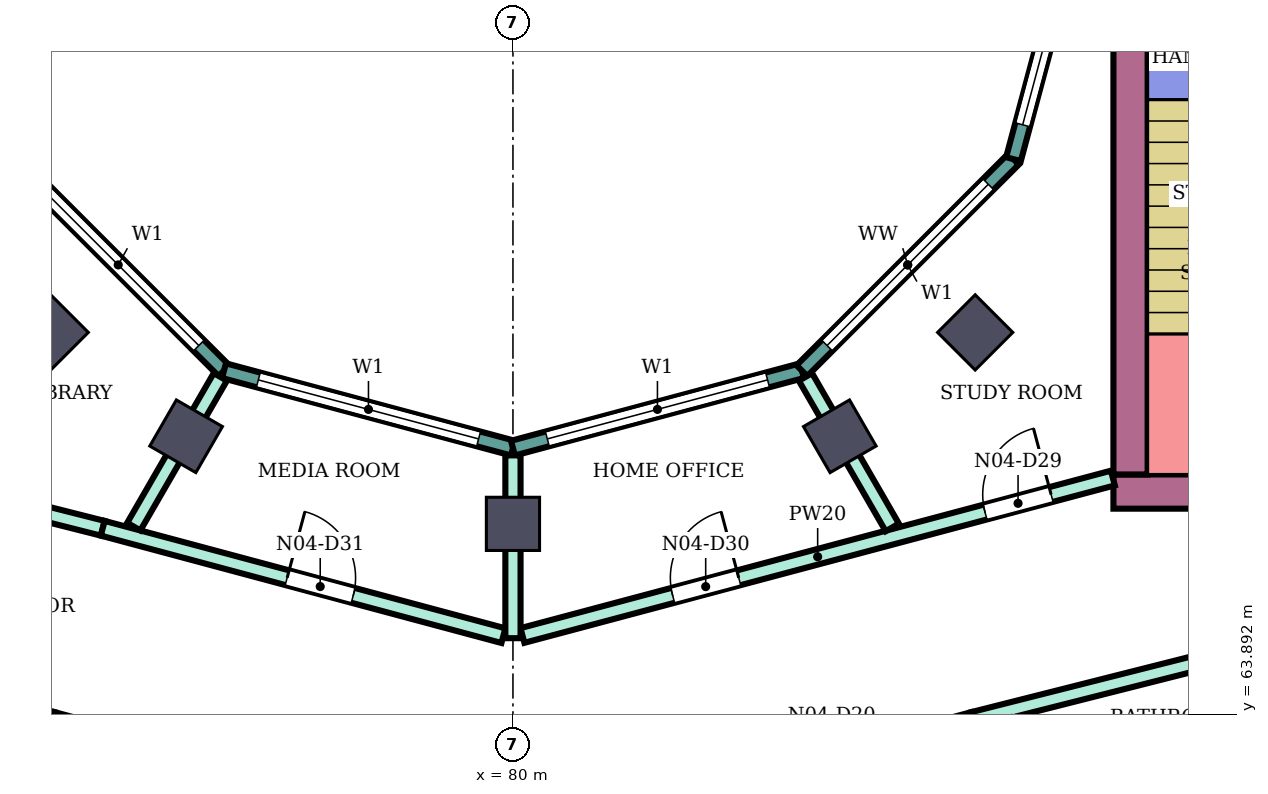
"""IFC4 building model, lengths in metres.
Left out: names, types, materials, properties, quantities, classifications, styles, units other than length and angle.
Written with IfcOpenShell. Run it as: python <this file> out.ifc"""

import sys

from ifc_helpers import new_model, si_unit, direction, frame, frame_2d, origin, origin_2d, place, context, subcontext, project, spatial, rectangle, extrude, element, fill, save


model = new_model("IFC4")
c1 = context("Model", 3, precision=1e-05, world=origin(), true_north=direction((0.0, 1.0)))
c2 = subcontext(c1, "Body", "Model", "MODEL_VIEW")
j1 = project(units=[si_unit("LENGTHUNIT", "METRE"), si_unit("PLANEANGLEUNIT", "RADIAN")], contexts=[c1])
p1 = place(None, origin())
s1 = spatial("IfcSite", under=j1, at=p1, CompositionType="ELEMENT")
p2 = place(p1, origin())
s2 = spatial("IfcBuilding", under=s1, at=p2, CompositionType="ELEMENT")
p3 = place(p2, frame((0.0, 0.0, 305.1)))
s3 = spatial("IfcBuildingStorey", under=s2, at=p3, CompositionType="ELEMENT", Elevation=305.1)
for number, where, z_axis, x_axis in (
    (1, (73.919, 68.919, 0.0), (0.0, 0.0, 1.0), (-0.707, -0.707, 0.0)),
    (2, (75.7, 67.552, 0.0), (0.0, 0.0, 1.0), (-0.5, -0.866, 0.0)),
    (3, (80.0, 66.4, 0.0), (0.0, 0.0, 1.0), (0.0, -1.0, 0.0)),
    (4, (84.3, 67.552, 0.0), (0.0, 0.0, 1.0), (0.5, -0.866, 0.0)),
    (5, (86.081, 68.919, 0.0), (0.0, 0.0, 1.0), (0.707, -0.707, 0.0)),
):
    element("IfcColumn", number, at=place(p3, frame(where, z_axis=z_axis, x_axis=x_axis)), inside=s3, PredefinedType="COLUMN", context=c2, shape_type="SweptSolid", body=[
        extrude(rectangle(XDim=0.7, YDim=0.7, at=origin_2d()), origin(), (0.0, 0.0, 1.0), 4.2),
    ])
p4 = place(p3, frame((87.9, 66.825, 0.0), z_axis=(0.0, 0.0, 1.0), x_axis=(1.0, 0.0, 0.0)))
e6 = element("IfcWall", 6, at=p4, inside=s3, PredefinedType="SHEAR", context=c2, shape_type="SweptSolid", body=[
    extrude(rectangle(XDim=12.0, YDim=0.45, at=frame_2d((6.0, 0.0))), origin(), (0.0, 0.0, 1.0), 3.85),
])
p5 = place(p4, frame((4.2, 0.0, 0.0)))
e7 = element("IfcOpeningElement", 7, at=p5, cuts=e6, PredefinedType="OPENING", context=c2, shape_type="SweptSolid", body=[
    extrude(rectangle(XDim=2.4, YDim=2.4, at=frame_2d((1.2, 1.2))), frame((0.0, 0.235, 0.0), z_axis=(0.0, -1.0, 0.0), x_axis=(1.0, 0.0, 0.0)), (0.0, 0.0, 1.0), 0.47),
])
p6 = place(p3, frame((88.125, 67.05, 0.0), z_axis=(0.0, 0.0, 1.0), x_axis=(0.0, 1.0, 0.0)))
e8 = element("IfcWall", 8, at=p6, inside=s3, PredefinedType="SHEAR", context=c2, shape_type="SweptSolid", body=[
    extrude(rectangle(XDim=7.95, YDim=0.45, at=frame_2d((3.975, 0.0))), origin(), (0.0, 0.0, 1.0), 3.85),
])
p7 = place(p3, frame((73.415, 71.198, 0.0), z_axis=(0.0, 0.0, 1.0), x_axis=(0.707106781187, -0.707106781187, 0.0)))
e9 = element("IfcWall", 9, at=p7, inside=s3, PredefinedType="NOTDEFINED", context=c2, shape_type="SweptSolid", body=[
    extrude(rectangle(XDim=3.936, YDim=0.2, at=frame_2d((1.968, 0.0))), origin(), (0.0, 0.0, 1.0), 4.2),
])
p8 = place(p7, frame((0.468, 0.0, 0.9)))
e10 = element("IfcOpeningElement", 10, at=p8, cuts=e9, PredefinedType="OPENING", context=c2, shape_type="SweptSolid", body=[
    extrude(rectangle(XDim=3.0, YDim=2.3, at=frame_2d((1.5, 1.15))), frame((0.0, 0.11, 0.0), z_axis=(0.0, -1.0, 0.0), x_axis=(1.0, 0.0, 0.0)), (0.0, 0.0, 1.0), 0.22),
])
p9 = place(p3, frame((76.198, 68.415, 0.0), z_axis=(0.0, 0.0, 1.0), x_axis=(0.965933654434, -0.258789828301, 0.0)))
e11 = element("IfcWall", 11, at=p9, inside=s3, PredefinedType="NOTDEFINED", context=c2, shape_type="SweptSolid", body=[
    extrude(rectangle(XDim=3.936, YDim=0.2, at=frame_2d((1.968, 0.0))), origin(), (0.0, 0.0, 1.0), 4.2),
])
p10 = place(p9, frame((0.468, 0.0, 0.9)))
e12 = element("IfcOpeningElement", 12, at=p10, cuts=e11, PredefinedType="OPENING", context=c2, shape_type="SweptSolid", body=[
    extrude(rectangle(XDim=3.0, YDim=2.3, at=frame_2d((1.5, 1.15))), frame((0.0, 0.11, 0.0), z_axis=(0.0, -1.0, 0.0), x_axis=(1.0, 0.0, 0.0)), (0.0, 0.0, 1.0), 0.22),
])
p11 = place(p3, frame((80.0, 67.396, 0.0), z_axis=(0.0, 0.0, 1.0), x_axis=(0.965933654434, 0.258789828301, 0.0)))
e13 = element("IfcWall", 13, at=p11, inside=s3, PredefinedType="NOTDEFINED", context=c2, shape_type="SweptSolid", body=[
    extrude(rectangle(XDim=3.936, YDim=0.2, at=frame_2d((1.968, 0.0))), origin(), (0.0, 0.0, 1.0), 4.2),
])
p12 = place(p11, frame((0.468, 0.0, 0.9)))
e14 = element("IfcOpeningElement", 14, at=p12, cuts=e13, PredefinedType="OPENING", context=c2, shape_type="SweptSolid", body=[
    extrude(rectangle(XDim=3.0, YDim=2.3, at=frame_2d((1.5, 1.15))), frame((0.0, 0.11, 0.0), z_axis=(0.0, -1.0, 0.0), x_axis=(1.0, 0.0, 0.0)), (0.0, 0.0, 1.0), 0.22),
])
p13 = place(p3, frame((83.802, 68.415, 0.0), z_axis=(0.0, 0.0, 1.0), x_axis=(0.707106781187, 0.707106781187, 0.0)))
e15 = element("IfcWall", 15, at=p13, inside=s3, PredefinedType="NOTDEFINED", context=c2, shape_type="SweptSolid", body=[
    extrude(rectangle(XDim=3.936, YDim=0.2, at=frame_2d((1.968, 0.0))), origin(), (0.0, 0.0, 1.0), 4.2),
])
p14 = place(p13, frame((0.468, 0.0, 0.9)))
e16 = element("IfcOpeningElement", 16, at=p14, cuts=e15, PredefinedType="OPENING", context=c2, shape_type="SweptSolid", body=[
    extrude(rectangle(XDim=3.0, YDim=2.3, at=frame_2d((1.5, 1.15))), frame((0.0, 0.11, 0.0), z_axis=(0.0, -1.0, 0.0), x_axis=(1.0, 0.0, 0.0)), (0.0, 0.0, 1.0), 0.22),
])
p15 = place(p3, frame((86.585, 71.198, 0.0), z_axis=(0.0, 0.0, 1.0), x_axis=(0.258789828301, 0.965933654434, 0.0)))
e17 = element("IfcWall", 17, at=p15, inside=s3, PredefinedType="NOTDEFINED", context=c2, shape_type="SweptSolid", body=[
    extrude(rectangle(XDim=3.936, YDim=0.2, at=frame_2d((1.968, 0.0))), origin(), (0.0, 0.0, 1.0), 4.2),
])
p16 = place(p15, frame((0.468, 0.0, 0.9)))
e18 = element("IfcOpeningElement", 18, at=p16, cuts=e17, PredefinedType="OPENING", context=c2, shape_type="SweptSolid", body=[
    extrude(rectangle(XDim=3.0, YDim=2.3, at=frame_2d((1.5, 1.15))), frame((0.0, 0.11, 0.0), z_axis=(0.0, -1.0, 0.0), x_axis=(1.0, 0.0, 0.0)), (0.0, 0.0, 1.0), 0.22),
])
p17 = place(p3, frame((68.2, 65.28, 0.0), z_axis=(0.0, 0.0, 1.0), x_axis=(0.969450596516, -0.245286650503, 0.0)))
e19 = element("IfcWall", 19, at=p17, inside=s3, PredefinedType="PARTITIONING", context=c2, shape_type="SweptSolid", body=[
    extrude(rectangle(XDim=5.928, YDim=0.2, at=frame_2d((2.964, 0.0))), origin(), (0.0, 0.0, 1.0), 3.75),
])
p18 = place(p17, frame((2.24, 0.0, 0.0)))
e20 = element("IfcOpeningElement", 20, at=p18, cuts=e19, PredefinedType="OPENING", context=c2, shape_type="SweptSolid", body=[
    extrude(rectangle(XDim=1.0, YDim=2.1, at=frame_2d((0.5, 1.05))), frame((0.0, 0.11, 0.0), z_axis=(0.0, -1.0, 0.0), x_axis=(1.0, 0.0, 0.0)), (0.0, 0.0, 1.0), 0.22),
])
p19 = place(p3, frame((72.1, 66.975, 0.0), z_axis=(0.0, 0.0, 1.0), x_axis=(0.969471314457, -0.245204752086, 0.0)))
e21 = element("IfcWall", 21, at=p19, inside=s3, PredefinedType="PARTITIONING", context=c2, shape_type="SweptSolid", body=[
    extrude(rectangle(XDim=2.582, YDim=0.2, at=frame_2d((1.291, 0.0))), origin(), (0.0, 0.0, 1.0), 3.75),
])
p20 = place(p19, frame((0.841, 0.0, 0.0)))
e22 = element("IfcOpeningElement", 22, at=p20, cuts=e21, PredefinedType="OPENING", context=c2, shape_type="SweptSolid", body=[
    extrude(rectangle(XDim=0.9, YDim=2.1, at=frame_2d((0.45, 1.05))), frame((0.0, 0.11, 0.0), z_axis=(0.0, -1.0, 0.0), x_axis=(1.0, 0.0, 0.0)), (0.0, 0.0, 1.0), 0.22),
])
p21 = place(p3, frame((73.947, 63.826, 0.0), z_axis=(0.0, 0.0, 1.0), x_axis=(0.965902169454, -0.258907317479, 0.0)))
e23 = element("IfcWall", 23, at=p21, inside=s3, PredefinedType="PARTITIONING", context=c2, shape_type="SweptSolid", body=[
    extrude(rectangle(XDim=6.177, YDim=0.2, at=frame_2d((3.088, 0.0))), origin(), (0.0, 0.0, 1.0), 3.75),
])
p22 = place(p21, frame((4.717, 0.0, 0.0)))
e24 = element("IfcOpeningElement", 24, at=p22, cuts=e23, PredefinedType="OPENING", context=c2, shape_type="SweptSolid", body=[
    extrude(rectangle(XDim=1.0, YDim=2.1, at=frame_2d((0.5, 1.05))), frame((0.0, 0.11, 0.0), z_axis=(0.0, -1.0, 0.0), x_axis=(1.0, 0.0, 0.0)), (0.0, 0.0, 1.0), 0.22),
])
p23 = place(p3, frame((74.603, 66.342, 0.0), z_axis=(0.0, 0.0, 1.0), x_axis=(0.965920893652, -0.258837453254, 0.0)))
e25 = element("IfcWall", 25, at=p23, inside=s3, PredefinedType="PARTITIONING", context=c2, shape_type="SweptSolid", body=[
    extrude(rectangle(XDim=5.458, YDim=0.2, at=frame_2d((2.729, 0.0))), origin(), (0.0, 0.0, 1.0), 3.75),
])
p24 = place(p23, frame((2.512, 0.0, 0.0)))
e26 = element("IfcOpeningElement", 26, at=p24, cuts=e25, PredefinedType="OPENING", context=c2, shape_type="SweptSolid", body=[
    extrude(rectangle(XDim=0.9, YDim=2.1, at=frame_2d((0.45, 1.05))), frame((0.0, 0.11, 0.0), z_axis=(0.0, -1.0, 0.0), x_axis=(1.0, 0.0, 0.0)), (0.0, 0.0, 1.0), 0.22),
])
p25 = place(p3, frame((75.012, 66.363, 0.0), z_axis=(0.0, 0.0, 1.0), x_axis=(0.500223967704, 0.86589605735, 0.0)))
e27 = element("IfcWall", 27, at=p25, inside=s3, PredefinedType="PARTITIONING", context=c2, shape_type="SweptSolid", body=[
    extrude(rectangle(XDim=2.275, YDim=0.2, at=frame_2d((1.138, 0.0))), origin(), (0.0, 0.0, 1.0), 3.75),
])
p26 = place(p3, frame((80.125, 64.932, 0.0), z_axis=(0.0, 0.0, 1.0), x_axis=(0.966236955806, 0.257655089674, 0.0)))
e28 = element("IfcWall", 28, at=p26, inside=s3, PredefinedType="PARTITIONING", context=c2, shape_type="SweptSolid", body=[
    extrude(rectangle(XDim=8.039, YDim=0.2, at=frame_2d((4.02, 0.0))), origin(), (0.0, 0.0, 1.0), 3.75),
])
p27 = place(p26, frame((6.298, 0.0, 0.0)))
e29 = element("IfcOpeningElement", 29, at=p27, cuts=e28, PredefinedType="OPENING", context=c2, shape_type="SweptSolid", body=[
    extrude(rectangle(XDim=0.9, YDim=2.1, at=frame_2d((0.45, 1.05))), frame((0.0, 0.11, 0.0), z_axis=(0.0, -1.0, 0.0), x_axis=(1.0, 0.0, 0.0)), (0.0, 0.0, 1.0), 0.22),
])
p28 = place(p26, frame((2.045, 0.0, 0.0)))
e30 = element("IfcOpeningElement", 30, at=p28, cuts=e28, PredefinedType="OPENING", context=c2, shape_type="SweptSolid", body=[
    extrude(rectangle(XDim=0.9, YDim=2.1, at=frame_2d((0.45, 1.05))), frame((0.0, 0.11, 0.0), z_axis=(0.0, -1.0, 0.0), x_axis=(1.0, 0.0, 0.0)), (0.0, 0.0, 1.0), 0.22),
])
p29 = place(p3, frame((80.0, 62.204, 0.0), z_axis=(0.0, 0.0, 1.0), x_axis=(0.965938139786, 0.258773086132, 0.0)))
e31 = element("IfcWall", 31, at=p29, inside=s3, PredefinedType="PARTITIONING", context=c2, shape_type="SweptSolid", body=[
    extrude(rectangle(XDim=6.266, YDim=0.2, at=frame_2d((3.133, 0.0))), origin(), (0.0, 0.0, 1.0), 3.75),
])
p30 = place(p29, frame((3.842, 0.0, 0.0)))
e32 = element("IfcOpeningElement", 32, at=p30, cuts=e31, PredefinedType="OPENING", context=c2, shape_type="SweptSolid", body=[
    extrude(rectangle(XDim=1.0, YDim=2.1, at=frame_2d((0.5, 1.05))), frame((0.0, 0.11, 0.0), z_axis=(0.0, -1.0, 0.0), x_axis=(1.0, 0.0, 0.0)), (0.0, 0.0, 1.0), 0.22),
])
p31 = place(p3, frame((80.0, 64.896, 0.0), z_axis=(0.0, 0.0, 1.0), x_axis=(0.0, 1.0, 0.0)))
e33 = element("IfcWall", 33, at=p31, inside=s3, PredefinedType="PARTITIONING", context=c2, shape_type="SweptSolid", body=[
    extrude(rectangle(XDim=2.405, YDim=0.2, at=frame_2d((1.203, 0.0))), origin(), (0.0, 0.0, 1.0), 3.75),
])
p32 = place(p3, frame((83.848, 68.333, 0.0), z_axis=(0.0, 0.0, 1.0), x_axis=(0.499873506666, -0.866098422429, 0.0)))
e34 = element("IfcWall", 34, at=p32, inside=s3, PredefinedType="PARTITIONING", context=c2, shape_type="SweptSolid", body=[
    extrude(rectangle(XDim=2.285, YDim=0.2, at=frame_2d((1.143, 0.0))), origin(), (0.0, 0.0, 1.0), 3.75),
])
p33 = place(p3, frame((86.053, 63.826, 0.0), z_axis=(0.0, 0.0, 1.0), x_axis=(0.969490004987, 0.245130843083, 0.0)))
e35 = element("IfcWall", 35, at=p33, inside=s3, PredefinedType="PARTITIONING", context=c2, shape_type="SweptSolid", body=[
    extrude(rectangle(XDim=5.908, YDim=0.2, at=frame_2d((2.954, 0.0))), origin(), (0.0, 0.0, 1.0), 3.75),
])
p34 = place(p3, frame((87.132, 62.861, 0.0), z_axis=(0.0, 0.0, 1.0), x_axis=(0.969469230998, 0.245212989354, 0.0)))
e36 = element("IfcWall", 36, at=p34, inside=s3, PredefinedType="PARTITIONING", context=c2, shape_type="SweptSolid", body=[
    extrude(rectangle(XDim=4.032, YDim=0.1, at=frame_2d((2.016, 0.0))), origin(), (0.0, 0.0, 1.0), 3.75),
])
p35 = place(p8, origin())
e37 = element("IfcWindow", 37, at=p35, inside=s3, PartitioningType="SINGLE_PANEL", PredefinedType="WINDOW", context=c2, shape_type="SweptSolid", body=[
    extrude(rectangle(XDim=3.0, YDim=2.3, at=frame_2d((1.5, 1.15))), frame((0.0, 0.03, 0.0), z_axis=(0.0, -1.0, 0.0), x_axis=(1.0, 0.0, 0.0)), (0.0, 0.0, 1.0), 0.06),
])
fill(e10, e37)
p36 = place(p10, origin())
e38 = element("IfcWindow", 38, at=p36, inside=s3, PartitioningType="SINGLE_PANEL", PredefinedType="WINDOW", context=c2, shape_type="SweptSolid", body=[
    extrude(rectangle(XDim=3.0, YDim=2.3, at=frame_2d((1.5, 1.15))), frame((0.0, 0.03, 0.0), z_axis=(0.0, -1.0, 0.0), x_axis=(1.0, 0.0, 0.0)), (0.0, 0.0, 1.0), 0.06),
])
fill(e12, e38)
p37 = place(p12, origin())
e39 = element("IfcWindow", 39, at=p37, inside=s3, PartitioningType="SINGLE_PANEL", PredefinedType="WINDOW", context=c2, shape_type="SweptSolid", body=[
    extrude(rectangle(XDim=3.0, YDim=2.3, at=frame_2d((1.5, 1.15))), frame((0.0, 0.03, 0.0), z_axis=(0.0, -1.0, 0.0), x_axis=(1.0, 0.0, 0.0)), (0.0, 0.0, 1.0), 0.06),
])
fill(e14, e39)
p38 = place(p14, origin())
e40 = element("IfcWindow", 40, at=p38, inside=s3, PartitioningType="SINGLE_PANEL", PredefinedType="WINDOW", context=c2, shape_type="SweptSolid", body=[
    extrude(rectangle(XDim=3.0, YDim=2.3, at=frame_2d((1.5, 1.15))), frame((0.0, 0.03, 0.0), z_axis=(0.0, -1.0, 0.0), x_axis=(1.0, 0.0, 0.0)), (0.0, 0.0, 1.0), 0.06),
])
fill(e16, e40)
p39 = place(p16, origin())
e41 = element("IfcWindow", 41, at=p39, inside=s3, PartitioningType="SINGLE_PANEL", PredefinedType="WINDOW", context=c2, shape_type="SweptSolid", body=[
    extrude(rectangle(XDim=3.0, YDim=2.3, at=frame_2d((1.5, 1.15))), frame((0.0, 0.03, 0.0), z_axis=(0.0, -1.0, 0.0), x_axis=(1.0, 0.0, 0.0)), (0.0, 0.0, 1.0), 0.06),
])
fill(e18, e41)
p40 = place(p27, origin())
e42 = element("IfcDoor", 42, at=p40, inside=s3, OperationType="SINGLE_SWING_RIGHT", PredefinedType="DOOR", context=c2, shape_type="SweptSolid", body=[
    extrude(rectangle(XDim=0.9, YDim=2.1, at=frame_2d((0.45, 1.05))), frame((0.0, 0.025, 0.0), z_axis=(0.0, -1.0, 0.0), x_axis=(1.0, 0.0, 0.0)), (0.0, 0.0, 1.0), 0.05),
])
fill(e29, e42)
p41 = place(p28, origin())
e43 = element("IfcDoor", 43, at=p41, inside=s3, OperationType="SINGLE_SWING_RIGHT", PredefinedType="DOOR", context=c2, shape_type="SweptSolid", body=[
    extrude(rectangle(XDim=0.9, YDim=2.1, at=frame_2d((0.45, 1.05))), frame((0.0, 0.025, 0.0), z_axis=(0.0, -1.0, 0.0), x_axis=(1.0, 0.0, 0.0)), (0.0, 0.0, 1.0), 0.05),
])
fill(e30, e43)
p42 = place(p24, origin())
e44 = element("IfcDoor", 44, at=p42, inside=s3, OperationType="SINGLE_SWING_LEFT", PredefinedType="DOOR", context=c2, shape_type="SweptSolid", body=[
    extrude(rectangle(XDim=0.9, YDim=2.1, at=frame_2d((0.45, 1.05))), frame((0.0, 0.025, 0.0), z_axis=(0.0, -1.0, 0.0), x_axis=(1.0, 0.0, 0.0)), (0.0, 0.0, 1.0), 0.05),
])
fill(e26, e44)
save(model, sys.argv[1])
